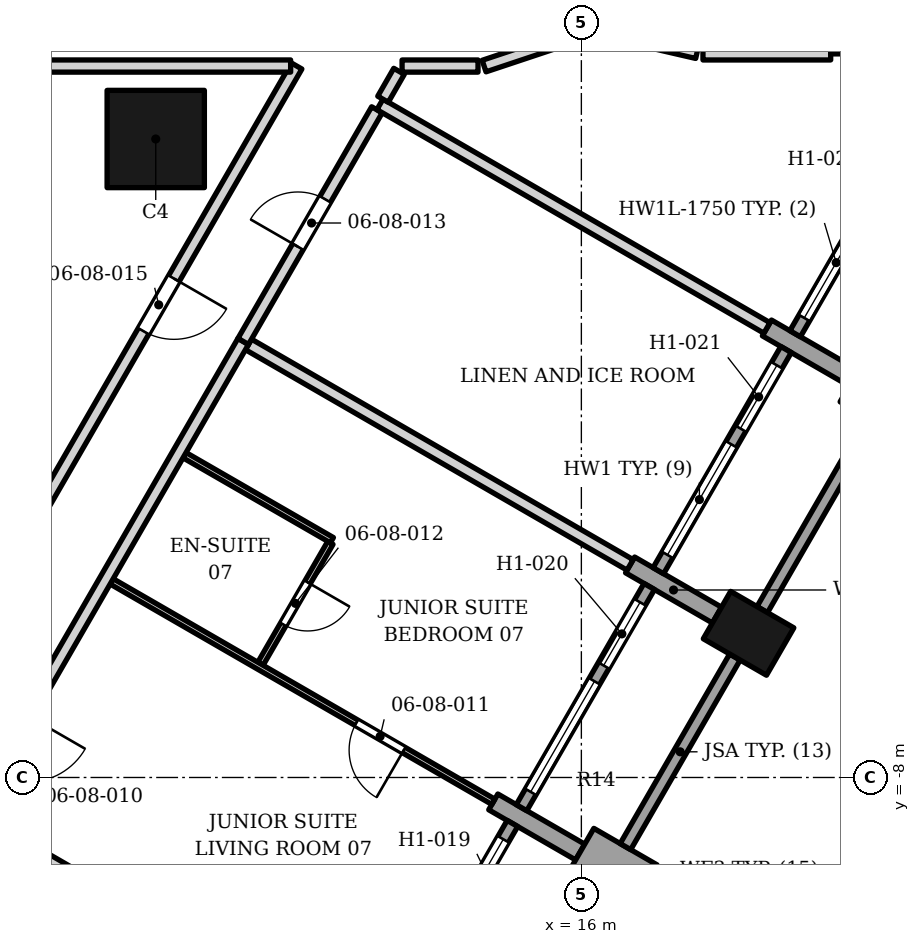
"""IFC4 building model, lengths in metres.
Left out: names, types, materials, properties, quantities, classifications, styles, units other than length and angle.
Written with IfcOpenShell. Run it as: python <this file> out.ifc"""

import sys

from ifc_helpers import new_model, si_unit, direction, frame, frame_2d, origin, origin_2d, place, context, subcontext, project, spatial, rectangle, extrude, element, fill, save


model = new_model("IFC4")
c1 = context("Model", 3, precision=1e-05, world=origin(), true_north=direction((0.0, 1.0)))
c2 = subcontext(c1, "Body", "Model", "MODEL_VIEW")
j1 = project(units=[si_unit("LENGTHUNIT", "METRE"), si_unit("PLANEANGLEUNIT", "RADIAN")], contexts=[c1])
p1 = place(None, origin())
s1 = spatial("IfcSite", under=j1, at=p1, CompositionType="ELEMENT")
p2 = place(p1, origin())
s2 = spatial("IfcBuilding", under=s1, at=p2, CompositionType="ELEMENT")
p3 = place(p2, frame((0.0, 0.0, 46.0)))
s3 = spatial("IfcBuildingStorey", under=s2, at=p3, CompositionType="ELEMENT", Elevation=46.0)
p4 = place(p3, frame((9.0, 2.5, 0.0), z_axis=(0.0, 0.0, 1.0), x_axis=(1.0, 0.0, 0.0)))
e1 = element("IfcColumn", 1, at=p4, inside=s3, PredefinedType="COLUMN", context=c2, shape_type="SweptSolid", body=[
    extrude(rectangle(XDim=1.6, YDim=1.6, at=origin_2d()), origin(), (0.0, 0.0, 1.0), 3.4),
])
p5 = place(p3, frame((18.75, -5.629, 0.0), z_axis=(0.0, 0.0, 1.0), x_axis=(0.5, 0.866025403784, 0.0)))
e2 = element("IfcColumn", 2, at=p5, inside=s3, PredefinedType="COLUMN", context=c2, shape_type="SweptSolid", body=[
    extrude(rectangle(XDim=0.9, YDim=1.2, at=origin_2d()), origin(), (0.0, 0.0, 1.0), 3.4),
])
p6 = place(p3, frame((17.02, -9.826, 0.0), z_axis=(0.0, 0.0, 1.0), x_axis=(-0.866043267704, 0.499969057507, 0.0)))
e3 = element("IfcWall", 3, at=p6, inside=s3, PredefinedType="SOLIDWALL", context=c2, shape_type="SweptSolid", body=[
    extrude(rectangle(XDim=1.2, YDim=0.9, at=frame_2d((0.6, 0.0))), origin(), (0.0, 0.0, 1.0), 2.63),
])
p7 = place(p3, frame((15.98, -9.226, 0.0), z_axis=(0.0, 0.0, 1.0), x_axis=(-0.866040211805, 0.499974350878, 0.0)))
e4 = element("IfcWall", 4, at=p7, inside=s3, PredefinedType="SOLIDWALL", context=c2, shape_type="SweptSolid", body=[
    extrude(rectangle(XDim=1.65, YDim=0.3, at=frame_2d((0.825, 0.0))), origin(), (0.0, 0.0, 1.0), 2.65),
])
p8 = place(p3, frame((18.23, -5.329, 0.0), z_axis=(0.0, 0.0, 1.0), x_axis=(-0.866003217194, 0.500038426333, 0.0)))
e5 = element("IfcWall", 5, at=p8, inside=s3, PredefinedType="SOLIDWALL", context=c2, shape_type="SweptSolid", body=[
    extrude(rectangle(XDim=1.65, YDim=0.3, at=frame_2d((0.825, 0.0))), origin(), (0.0, 0.0, 1.0), 2.65),
])
p9 = place(p3, frame((21.52, -2.032, 0.0), z_axis=(0.0, 0.0, 1.0), x_axis=(-0.866043267704, 0.499969057507, 0.0)))
e6 = element("IfcWall", 6, at=p9, inside=s3, PredefinedType="SOLIDWALL", context=c2, shape_type="SweptSolid", body=[
    extrude(rectangle(XDim=1.2, YDim=0.9, at=frame_2d((0.6, 0.0))), origin(), (0.0, 0.0, 1.0), 2.63),
])
p10 = place(p3, frame((20.48, -1.432, 0.0), z_axis=(0.0, 0.0, 1.0), x_axis=(-0.865976140824, 0.500085316245, 0.0)))
e7 = element("IfcWall", 7, at=p10, inside=s3, PredefinedType="SOLIDWALL", context=c2, shape_type="SweptSolid", body=[
    extrude(rectangle(XDim=1.65, YDim=0.3, at=frame_2d((0.825, 0.0))), origin(), (0.0, 0.0, 1.0), 2.65),
])
p11 = place(p3, frame((12.766, -12.394, 0.0), z_axis=(0.0, 0.0, 1.0), x_axis=(0.500002543286, 0.866023935413, 0.0)))
e8 = element("IfcWall", 8, at=p11, inside=s3, PredefinedType="ELEMENTEDWALL", context=c2, shape_type="SweptSolid", body=[
    extrude(rectangle(XDim=4.2, YDim=0.2, at=frame_2d((2.1, 0.0))), origin(), (0.0, 0.0, 1.0), 2.302),
])
p12 = place(p11, frame((0.3, 0.0, 0.6)))
e9 = element("IfcOpeningElement", 9, at=p12, cuts=e8, PredefinedType="OPENING", context=c2, shape_type="SweptSolid", body=[
    extrude(rectangle(XDim=2.1, YDim=1.6, at=frame_2d((1.05, 0.8))), frame((0.0, 0.11, 0.0), z_axis=(0.0, -1.0, 0.0), x_axis=(1.0, 0.0, 0.0)), (0.0, 0.0, 1.0), 0.22),
])
p13 = place(p11, frame((2.7, 0.0, 0.0)))
e10 = element("IfcOpeningElement", 10, at=p13, cuts=e8, PredefinedType="OPENING", context=c2, shape_type="SweptSolid", body=[
    extrude(rectangle(XDim=1.2, YDim=2.2, at=frame_2d((0.6, 1.1))), frame((0.0, 0.11, 0.0), z_axis=(0.0, -1.0, 0.0), x_axis=(1.0, 0.0, 0.0)), (0.0, 0.0, 1.0), 0.22),
])
p14 = place(p3, frame((16.725, -9.136, 0.0), z_axis=(0.0, 0.0, 1.0), x_axis=(0.499961193289, 0.866047807691, 0.0)))
e11 = element("IfcWall", 11, at=p14, inside=s3, PredefinedType="SOLIDWALL", context=c2, shape_type="SweptSolid", body=[
    extrude(rectangle(XDim=3.6, YDim=0.2, at=frame_2d((1.8, 0.0))), origin(), (0.0, 0.0, 1.0), 2.63),
])
p15 = place(p3, frame((15.016, -8.496, 0.0), z_axis=(0.0, 0.0, 1.0), x_axis=(0.500027713859, 0.866009402589, 0.0)))
e12 = element("IfcWall", 12, at=p15, inside=s3, PredefinedType="ELEMENTEDWALL", context=c2, shape_type="SweptSolid", body=[
    extrude(rectangle(XDim=4.2, YDim=0.2, at=frame_2d((2.1, 0.0))), origin(), (0.0, 0.0, 1.0), 2.65),
])
p16 = place(p15, frame((0.3, 0.0, 0.6)))
e13 = element("IfcOpeningElement", 13, at=p16, cuts=e12, PredefinedType="OPENING", context=c2, shape_type="SweptSolid", body=[
    extrude(rectangle(XDim=2.1, YDim=1.8, at=frame_2d((1.05, 0.9))), frame((0.0, 0.11, 0.0), z_axis=(0.0, -1.0, 0.0), x_axis=(1.0, 0.0, 0.0)), (0.0, 0.0, 1.0), 0.22),
])
p17 = place(p15, frame((2.7, 0.0, 0.0)))
e14 = element("IfcOpeningElement", 14, at=p17, cuts=e12, PredefinedType="OPENING", context=c2, shape_type="SweptSolid", body=[
    extrude(rectangle(XDim=1.2, YDim=2.4, at=frame_2d((0.6, 1.2))), frame((0.0, 0.11, 0.0), z_axis=(0.0, -1.0, 0.0), x_axis=(1.0, 0.0, 0.0)), (0.0, 0.0, 1.0), 0.22),
])
p18 = place(p3, frame((18.975, -5.24, 0.0), z_axis=(0.0, 0.0, 1.0), x_axis=(0.499961193289, 0.866047807691, 0.0)))
e15 = element("IfcWall", 15, at=p18, inside=s3, PredefinedType="SOLIDWALL", context=c2, shape_type="SweptSolid", body=[
    extrude(rectangle(XDim=3.6, YDim=0.2, at=frame_2d((1.8, 0.0))), origin(), (0.0, 0.0, 1.0), 2.63),
])
p19 = place(p3, frame((17.266, -4.599, 0.0), z_axis=(0.0, 0.0, 1.0), x_axis=(0.500002543286, 0.866023935413, 0.0)))
e16 = element("IfcWall", 16, at=p19, inside=s3, PredefinedType="ELEMENTEDWALL", context=c2, shape_type="SweptSolid", body=[
    extrude(rectangle(XDim=4.2, YDim=0.2, at=frame_2d((2.1, 0.0))), origin(), (0.0, 0.0, 1.0), 2.65),
])
p20 = place(p19, frame((0.3, 0.0, 0.6)))
e17 = element("IfcOpeningElement", 17, at=p20, cuts=e16, PredefinedType="OPENING", context=c2, shape_type="SweptSolid", body=[
    extrude(rectangle(XDim=2.1, YDim=1.8, at=frame_2d((1.05, 0.9))), frame((0.0, 0.11, 0.0), z_axis=(0.0, -1.0, 0.0), x_axis=(1.0, 0.0, 0.0)), (0.0, 0.0, 1.0), 0.22),
])
p21 = place(p19, frame((2.7, 0.0, 0.0)))
e18 = element("IfcOpeningElement", 18, at=p21, cuts=e16, PredefinedType="OPENING", context=c2, shape_type="SweptSolid", body=[
    extrude(rectangle(XDim=1.2, YDim=2.4, at=frame_2d((0.6, 1.2))), frame((0.0, 0.11, 0.0), z_axis=(0.0, -1.0, 0.0), x_axis=(1.0, 0.0, 0.0)), (0.0, 0.0, 1.0), 0.22),
])
p22 = place(p3, frame((19.516, -0.702, 0.0), z_axis=(0.0, 0.0, 1.0), x_axis=(0.500027713859, 0.866009402589, 0.0)))
e19 = element("IfcWall", 19, at=p22, inside=s3, PredefinedType="ELEMENTEDWALL", context=c2, shape_type="SweptSolid", body=[
    extrude(rectangle(XDim=4.2, YDim=0.2, at=frame_2d((2.1, 0.0))), origin(), (0.0, 0.0, 1.0), 2.45),
])
p23 = place(p22, frame((0.3, 0.0, 0.6)))
e20 = element("IfcOpeningElement", 20, at=p23, cuts=e19, PredefinedType="OPENING", context=c2, shape_type="SweptSolid", body=[
    extrude(rectangle(XDim=2.1, YDim=1.75, at=frame_2d((1.05, 0.875))), frame((0.0, 0.11, 0.0), z_axis=(0.0, -1.0, 0.0), x_axis=(1.0, 0.0, 0.0)), (0.0, 0.0, 1.0), 0.22),
])
p24 = place(p22, frame((2.7, 0.0, 0.0)))
e21 = element("IfcOpeningElement", 21, at=p24, cuts=e19, PredefinedType="OPENING", context=c2, shape_type="SweptSolid", body=[
    extrude(rectangle(XDim=1.2, YDim=2.35, at=frame_2d((0.6, 1.175))), frame((0.0, 0.11, 0.0), z_axis=(0.0, -1.0, 0.0), x_axis=(1.0, 0.0, 0.0)), (0.0, 0.0, 1.0), 0.22),
])
p25 = place(p3, frame((1.75, -12.87, 0.0), z_axis=(0.0, 0.0, 1.0), x_axis=(0.499999309361, 0.866025802525, 0.0)))
e22 = element("IfcWall", 22, at=p25, inside=s3, PredefinedType="PARTITIONING", context=c2, shape_type="SweptSolid", body=[
    extrude(rectangle(XDim=19.134, YDim=0.2, at=frame_2d((9.567, 0.0))), origin(), (0.0, 0.0, 1.0), 2.302),
])
p26 = place(p25, frame((14.098, 0.0, 0.0)))
e23 = element("IfcOpeningElement", 23, at=p26, cuts=e22, PredefinedType="OPENING", context=c2, shape_type="SweptSolid", body=[
    extrude(rectangle(XDim=1.0, YDim=2.1, at=frame_2d((0.5, 1.05))), frame((0.0, 0.11, 0.0), z_axis=(0.0, -1.0, 0.0), x_axis=(1.0, 0.0, 0.0)), (0.0, 0.0, 1.0), 0.22),
])
p27 = place(p25, frame((4.53, 0.0, 0.0)))
e24 = element("IfcOpeningElement", 24, at=p27, cuts=e22, PredefinedType="OPENING", context=c2, shape_type="SweptSolid", body=[
    extrude(rectangle(XDim=1.0, YDim=2.1, at=frame_2d((0.5, 1.05))), frame((0.0, 0.11, 0.0), z_axis=(0.0, -1.0, 0.0), x_axis=(1.0, 0.0, 0.0)), (0.0, 0.0, 1.0), 0.22),
])
p28 = place(p3, frame((6.024, -8.672, 0.0), z_axis=(0.0, 0.0, 1.0), x_axis=(0.865914666804, -0.500191753045, 0.0)))
e25 = element("IfcWall", 25, at=p28, inside=s3, PredefinedType="PARTITIONING", context=c2, shape_type="SweptSolid", body=[
    extrude(rectangle(XDim=7.25, YDim=0.2, at=frame_2d((3.625, 0.0))), origin(), (0.0, 0.0, 1.0), 2.302),
])
p29 = place(p3, frame((10.722, -6.13, 0.0), z_axis=(0.0, 0.0, 1.0), x_axis=(0.500617411337, 0.865668647617, 0.0)))
e26 = element("IfcWall", 26, at=p29, inside=s3, PredefinedType="PARTITIONING", context=c2, shape_type="SweptSolid", body=[
    extrude(rectangle(XDim=2.298, YDim=0.1, at=frame_2d((1.149, 0.0))), origin(), (0.0, 0.0, 1.0), 3.23),
])
p30 = place(p29, frame((0.748, 0.0, 0.0)))
e27 = element("IfcOpeningElement", 27, at=p30, cuts=e26, PredefinedType="OPENING", context=c2, shape_type="SweptSolid", body=[
    extrude(rectangle(XDim=0.8, YDim=2.1, at=frame_2d((0.4, 1.05))), frame((0.0, 0.06, 0.0), z_axis=(0.0, -1.0, 0.0), x_axis=(1.0, 0.0, 0.0)), (0.0, 0.0, 1.0), 0.12),
])
p31 = place(p3, frame((8.274, -4.775, 0.0), z_axis=(0.0, 0.0, 1.0), x_axis=(0.866035857012, -0.499981894041, 0.0)))
e28 = element("IfcWall", 28, at=p31, inside=s3, PredefinedType="PARTITIONING", context=c2, shape_type="SweptSolid", body=[
    extrude(rectangle(XDim=7.25, YDim=0.1, at=frame_2d((3.625, 0.0))), origin(), (0.0, 0.0, 1.0), 2.384),
])
p32 = place(p31, frame((4.65, 0.0, 0.0)))
e29 = element("IfcOpeningElement", 29, at=p32, cuts=e28, PredefinedType="OPENING", context=c2, shape_type="SweptSolid", body=[
    extrude(rectangle(XDim=0.9, YDim=2.1, at=frame_2d((0.45, 1.05))), frame((0.0, 0.06, 0.0), z_axis=(0.0, -1.0, 0.0), x_axis=(1.0, 0.0, 0.0)), (0.0, 0.0, 1.0), 0.12),
])
p33 = place(p3, frame((9.472, -2.699, 0.0), z_axis=(0.0, 0.0, 1.0), x_axis=(0.866288634608, -0.499543793424, 0.0)))
e30 = element("IfcWall", 30, at=p33, inside=s3, PredefinedType="PARTITIONING", context=c2, shape_type="SweptSolid", body=[
    extrude(rectangle(XDim=2.8, YDim=0.1, at=frame_2d((1.4, 0.0))), origin(), (0.0, 0.0, 1.0), 3.23),
])
p34 = place(p3, frame((10.525, -0.878, 0.0), z_axis=(0.0, 0.0, 1.0), x_axis=(0.865907869998, -0.500203519255, 0.0)))
e31 = element("IfcWall", 31, at=p34, inside=s3, PredefinedType="PARTITIONING", context=c2, shape_type="SweptSolid", body=[
    extrude(rectangle(XDim=7.248, YDim=0.2, at=frame_2d((3.624, 0.0))), origin(), (0.0, 0.0, 1.0), 2.384),
])
p35 = place(p3, frame((1.438, -16.419, 0.0), z_axis=(0.0, 0.0, 1.0), x_axis=(0.499996012009, 0.86602770624, 0.0)))
e32 = element("IfcWall", 32, at=p35, inside=s3, PredefinedType="PARTITIONING", context=c2, shape_type="SweptSolid", body=[
    extrude(rectangle(XDim=18.0, YDim=0.2, at=frame_2d((9.0, 0.0))), origin(), (0.0, 0.0, 1.0), 2.302),
])
p36 = place(p35, frame((4.0, 0.0, 0.0)))
e33 = element("IfcOpeningElement", 33, at=p36, cuts=e32, PredefinedType="OPENING", context=c2, shape_type="SweptSolid", body=[
    extrude(rectangle(XDim=1.0, YDim=2.1, at=frame_2d((0.5, 1.05))), frame((0.0, 0.11, 0.0), z_axis=(0.0, -1.0, 0.0), x_axis=(1.0, 0.0, 0.0)), (0.0, 0.0, 1.0), 0.22),
])
p37 = place(p35, frame((9.8, 0.0, 0.0)))
e34 = element("IfcOpeningElement", 34, at=p37, cuts=e32, PredefinedType="OPENING", context=c2, shape_type="SweptSolid", body=[
    extrude(rectangle(XDim=1.1, YDim=2.1, at=frame_2d((0.55, 1.05))), frame((0.0, 0.11, 0.0), z_axis=(0.0, -1.0, 0.0), x_axis=(1.0, 0.0, 0.0)), (0.0, 0.0, 1.0), 0.22),
])
p38 = place(p3, frame((10.439, -0.828, 0.0), z_axis=(0.0, 0.0, 1.0), x_axis=(0.500013981145, 0.866017331616, 0.0)))
e35 = element("IfcWall", 35, at=p38, inside=s3, PredefinedType="PARTITIONING", context=c2, shape_type="SweptSolid", body=[
    extrude(rectangle(XDim=4.398, YDim=0.2, at=frame_2d((2.199, 0.0))), origin(), (0.0, 0.0, 1.0), 3.23),
])
p39 = place(p38, frame((1.798, 0.0, 0.0)))
e36 = element("IfcOpeningElement", 36, at=p39, cuts=e35, PredefinedType="OPENING", context=c2, shape_type="SweptSolid", body=[
    extrude(rectangle(XDim=0.9, YDim=2.1, at=frame_2d((0.45, 1.05))), frame((0.0, 0.11, 0.0), z_axis=(0.0, -1.0, 0.0), x_axis=(1.0, 0.0, 0.0)), (0.0, 0.0, 1.0), 0.22),
])
p40 = place(p3, frame((12.688, 3.069, 0.0), z_axis=(0.0, 0.0, 1.0), x_axis=(0.86592997719, -0.500165247297, 0.0)))
e37 = element("IfcWall", 37, at=p40, inside=s3, PredefinedType="PARTITIONING", context=c2, shape_type="SweptSolid", body=[
    extrude(rectangle(XDim=7.35, YDim=0.2, at=frame_2d((3.675, 0.0))), origin(), (0.0, 0.0, 1.0), 2.384),
])
p41 = place(p3, frame((12.738, 3.154, 0.0), z_axis=(0.0, 0.0, 1.0), x_axis=(0.497976793054, 0.867190356023, 0.0)))
e38 = element("IfcWall", 38, at=p41, inside=s3, PredefinedType="PARTITIONING", context=c2, shape_type="SweptSolid", body=[
    extrude(rectangle(XDim=0.529, YDim=0.2, at=frame_2d((0.265, 0.0))), origin(), (0.0, 0.0, 1.0), 3.23),
])
p42 = place(p3, frame((6.0, 3.7, 0.0), z_axis=(0.0, 0.0, 1.0), x_axis=(1.0, 0.0, 0.0)))
e39 = element("IfcWall", 39, at=p42, inside=s3, PredefinedType="PARTITIONING", context=c2, shape_type="SweptSolid", body=[
    extrude(rectangle(XDim=5.219, YDim=0.2, at=frame_2d((2.609, 0.0))), origin(), (0.0, 0.0, 1.0), 2.832),
])
p43 = place(p3, frame((13.052, 3.699, 0.0), z_axis=(0.0, 0.0, 1.0), x_axis=(1.0, 0.0, 0.0)))
e40 = element("IfcWall", 40, at=p43, inside=s3, PredefinedType="PARTITIONING", context=c2, shape_type="SweptSolid", body=[
    extrude(rectangle(XDim=1.249, YDim=0.2, at=frame_2d((0.624, 0.0))), origin(), (0.0, 0.0, 1.0), 2.384),
])
p44 = place(p3, frame((18.0, 3.899, 0.0), z_axis=(0.0, 0.0, 1.0), x_axis=(0.999999993244, 0.000116238521, 0.0)))
e41 = element("IfcWall", 41, at=p44, inside=s3, PredefinedType="PARTITIONING", context=c2, shape_type="SweptSolid", body=[
    extrude(rectangle(XDim=2.1, YDim=0.2, at=frame_2d((1.05, 0.0))), origin(), (0.0, 0.0, 1.0), 3.23),
])
p45 = place(p3, frame((16.326, 4.287, 0.0), z_axis=(0.0, 0.0, 1.0), x_axis=(0.974302124523, -0.225245133464, 0.0)))
e42 = element("IfcWall", 42, at=p45, inside=s3, PredefinedType="PARTITIONING", context=c2, shape_type="SweptSolid", body=[
    extrude(rectangle(XDim=1.618, YDim=0.2, at=frame_2d((0.809, 0.0))), origin(), (0.0, 0.0, 1.0), 2.45),
])
p46 = place(p3, frame((14.4, 3.699, 0.0), z_axis=(0.0, 0.0, 1.0), x_axis=(0.948657960303, 0.316303769112, 0.0)))
e43 = element("IfcWall", 43, at=p46, inside=s3, PredefinedType="PARTITIONING", context=c2, shape_type="SweptSolid", body=[
    extrude(rectangle(XDim=1.927, YDim=0.2, at=frame_2d((0.964, 0.0))), origin(), (0.0, 0.0, 1.0), 3.23),
])
p47 = place(p3, frame((20.2, 3.9, 0.0), z_axis=(0.0, 0.0, 1.0), x_axis=(0.0, 1.0, 0.0)))
e44 = element("IfcWall", 44, at=p47, inside=s3, PredefinedType="PARTITIONING", context=c2, shape_type="SweptSolid", body=[
    extrude(rectangle(XDim=2.353, YDim=0.2, at=frame_2d((1.177, 0.0))), origin(), (0.0, 0.0, 1.0), 3.23),
])
p48 = place(p13, origin())
e45 = element("IfcDoor", 45, at=p48, inside=s3, OperationType="SINGLE_SWING_LEFT", PredefinedType="DOOR", context=c2, shape_type="SweptSolid", body=[
    extrude(rectangle(XDim=1.2, YDim=2.2, at=frame_2d((0.6, 1.1))), frame((0.0, 0.025, 0.0), z_axis=(0.0, -1.0, 0.0), x_axis=(1.0, 0.0, 0.0)), (0.0, 0.0, 1.0), 0.05),
])
fill(e10, e45)
p49 = place(p16, origin())
e46 = element("IfcWindow", 46, at=p49, inside=s3, PartitioningType="SINGLE_PANEL", PredefinedType="WINDOW", context=c2, shape_type="SweptSolid", body=[
    extrude(rectangle(XDim=2.1, YDim=1.8, at=frame_2d((1.05, 0.9))), frame((0.0, 0.03, 0.0), z_axis=(0.0, -1.0, 0.0), x_axis=(1.0, 0.0, 0.0)), (0.0, 0.0, 1.0), 0.06),
])
fill(e13, e46)
p50 = place(p17, origin())
e47 = element("IfcDoor", 47, at=p50, inside=s3, OperationType="SINGLE_SWING_LEFT", PredefinedType="DOOR", context=c2, shape_type="SweptSolid", body=[
    extrude(rectangle(XDim=1.2, YDim=2.4, at=frame_2d((0.6, 1.2))), frame((0.0, 0.025, 0.0), z_axis=(0.0, -1.0, 0.0), x_axis=(1.0, 0.0, 0.0)), (0.0, 0.0, 1.0), 0.05),
])
fill(e14, e47)
p51 = place(p20, origin())
e48 = element("IfcWindow", 48, at=p51, inside=s3, PartitioningType="SINGLE_PANEL", PredefinedType="WINDOW", context=c2, shape_type="SweptSolid", body=[
    extrude(rectangle(XDim=2.1, YDim=1.8, at=frame_2d((1.05, 0.9))), frame((0.0, 0.03, 0.0), z_axis=(0.0, -1.0, 0.0), x_axis=(1.0, 0.0, 0.0)), (0.0, 0.0, 1.0), 0.06),
])
fill(e17, e48)
p52 = place(p21, origin())
e49 = element("IfcDoor", 49, at=p52, inside=s3, OperationType="SINGLE_SWING_LEFT", PredefinedType="DOOR", context=c2, shape_type="SweptSolid", body=[
    extrude(rectangle(XDim=1.2, YDim=2.4, at=frame_2d((0.6, 1.2))), frame((0.0, 0.025, 0.0), z_axis=(0.0, -1.0, 0.0), x_axis=(1.0, 0.0, 0.0)), (0.0, 0.0, 1.0), 0.05),
])
fill(e18, e49)
p53 = place(p23, origin())
e50 = element("IfcWindow", 50, at=p53, inside=s3, PartitioningType="SINGLE_PANEL", PredefinedType="WINDOW", context=c2, shape_type="SweptSolid", body=[
    extrude(rectangle(XDim=2.1, YDim=1.75, at=frame_2d((1.05, 0.875))), frame((0.0, 0.03, 0.0), z_axis=(0.0, -1.0, 0.0), x_axis=(1.0, 0.0, 0.0)), (0.0, 0.0, 1.0), 0.06),
])
fill(e20, e50)
p54 = place(p32, origin())
e51 = element("IfcDoor", 51, at=p54, inside=s3, OperationType="SINGLE_SWING_RIGHT", PredefinedType="DOOR", context=c2, shape_type="SweptSolid", body=[
    extrude(rectangle(XDim=0.9, YDim=2.1, at=frame_2d((0.45, 1.05))), frame((0.0, 0.025, 0.0), z_axis=(0.0, -1.0, 0.0), x_axis=(1.0, 0.0, 0.0)), (0.0, 0.0, 1.0), 0.05),
])
fill(e29, e51)
p55 = place(p30, origin())
e52 = element("IfcDoor", 52, at=p55, inside=s3, OperationType="SINGLE_SWING_RIGHT", PredefinedType="DOOR", context=c2, shape_type="SweptSolid", body=[
    extrude(rectangle(XDim=0.8, YDim=2.1, at=frame_2d((0.4, 1.05))), frame((0.0, 0.025, 0.0), z_axis=(0.0, -1.0, 0.0), x_axis=(1.0, 0.0, 0.0)), (0.0, 0.0, 1.0), 0.05),
])
fill(e27, e52)
p56 = place(p39, origin())
e53 = element("IfcDoor", 53, at=p56, inside=s3, OperationType="SINGLE_SWING_LEFT", PredefinedType="DOOR", context=c2, shape_type="SweptSolid", body=[
    extrude(rectangle(XDim=0.9, YDim=2.1, at=frame_2d((0.45, 1.05))), frame((0.0, 0.025, 0.0), z_axis=(0.0, -1.0, 0.0), x_axis=(1.0, 0.0, 0.0)), (0.0, 0.0, 1.0), 0.05),
])
fill(e36, e53)
p57 = place(p26, origin())
e54 = element("IfcDoor", 54, at=p57, inside=s3, OperationType="SINGLE_SWING_RIGHT", PredefinedType="DOOR", context=c2, shape_type="SweptSolid", body=[
    extrude(rectangle(XDim=1.0, YDim=2.1, at=frame_2d((0.5, 1.05))), frame((0.0, 0.025, 0.0), z_axis=(0.0, -1.0, 0.0), x_axis=(1.0, 0.0, 0.0)), (0.0, 0.0, 1.0), 0.05),
])
fill(e23, e54)
save(model, sys.argv[1])
